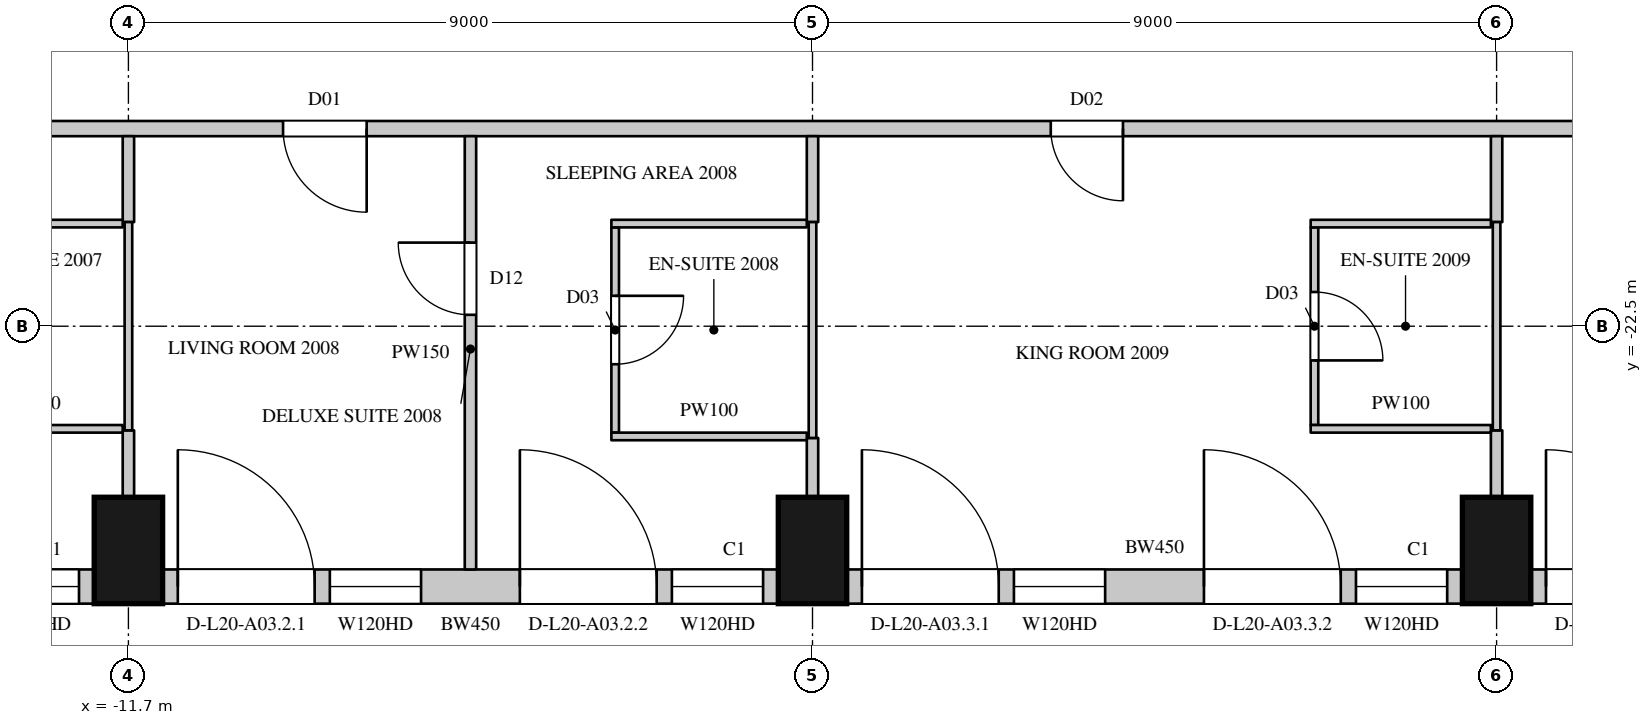
"""IFC4 building model, lengths in metres.
Left out: names, types, materials, properties, quantities, classifications, styles, units other than length and angle.
Written with IfcOpenShell. Run it as: python <this file> out.ifc"""

import sys

from ifc_helpers import new_model, si_unit, direction, frame, frame_2d, origin, origin_2d, place, context, subcontext, project, spatial, rectangle, extrude, element, fill, save


model = new_model("IFC4")
c1 = context("Model", 3, precision=1e-05, world=origin(), true_north=direction((0.0, 1.0)))
c2 = subcontext(c1, "Body", "Model", "MODEL_VIEW")
j1 = project(units=[si_unit("LENGTHUNIT", "METRE"), si_unit("PLANEANGLEUNIT", "RADIAN")], contexts=[c1])
p1 = place(None, origin())
s1 = spatial("IfcSite", under=j1, at=p1, CompositionType="ELEMENT")
p2 = place(p1, origin())
s2 = spatial("IfcBuilding", under=s1, at=p2, CompositionType="ELEMENT")
p3 = place(p2, frame((0.0, 0.0, 102.3)))
s3 = spatial("IfcBuildingStorey", under=s2, at=p3, CompositionType="ELEMENT", Elevation=102.3)
for number, where, z_axis, x_axis in (
    (1, (-11.7, -25.45, 0.0), (0.0, 0.0, 1.0), (1.0, 0.0, 0.0)),
    (2, (-2.7, -25.45, 0.0), (0.0, 0.0, 1.0), (1.0, 0.0, 0.0)),
    (3, (6.3, -25.45, 0.0), (0.0, 0.0, 1.0), (1.0, 0.0, 0.0)),
):
    element("IfcColumn", number, at=place(p3, frame(where, z_axis=z_axis, x_axis=x_axis)), inside=s3, PredefinedType="COLUMN", context=c2, shape_type="SweptSolid", body=[
        extrude(rectangle(XDim=0.9, YDim=1.4, at=origin_2d()), origin(), (0.0, 0.0, 1.0), 3.6),
    ])
p4 = place(p3, frame((-20.25, -25.925, 0.0), z_axis=(0.0, 0.0, 1.0), x_axis=(1.0, 0.0, 0.0)))
e4 = element("IfcWall", 4, at=p4, inside=s3, PredefinedType="SOLIDWALL", context=c2, shape_type="SweptSolid", body=[
    extrude(rectangle(XDim=8.1, YDim=0.45, at=frame_2d((4.05, 0.0))), origin(), (0.0, 0.0, 1.0), 3.3),
])
p5 = place(p4, frame((0.2, 0.0, 0.0)))
e5 = element("IfcOpeningElement", 5, at=p5, cuts=e4, PredefinedType="OPENING", context=c2, shape_type="SweptSolid", body=[
    extrude(rectangle(XDim=1.8, YDim=2.4, at=frame_2d((0.9, 1.2))), frame((0.0, 0.235, 0.0), z_axis=(0.0, -1.0, 0.0), x_axis=(1.0, 0.0, 0.0)), (0.0, 0.0, 1.0), 0.47),
])
p6 = place(p4, frame((2.2, 0.0, 1.05)))
e6 = element("IfcOpeningElement", 6, at=p6, cuts=e4, PredefinedType="OPENING", context=c2, shape_type="SweptSolid", body=[
    extrude(rectangle(XDim=1.2, YDim=2.0, at=frame_2d((0.6, 1.0))), frame((0.0, 0.235, 0.0), z_axis=(0.0, -1.0, 0.0), x_axis=(1.0, 0.0, 0.0)), (0.0, 0.0, 1.0), 0.47),
])
p7 = place(p4, frame((4.7, 0.0, 0.0)))
e7 = element("IfcOpeningElement", 7, at=p7, cuts=e4, PredefinedType="OPENING", context=c2, shape_type="SweptSolid", body=[
    extrude(rectangle(XDim=1.8, YDim=2.4, at=frame_2d((0.9, 1.2))), frame((0.0, 0.235, 0.0), z_axis=(0.0, -1.0, 0.0), x_axis=(1.0, 0.0, 0.0)), (0.0, 0.0, 1.0), 0.47),
])
p8 = place(p4, frame((6.7, 0.0, 1.05)))
e8 = element("IfcOpeningElement", 8, at=p8, cuts=e4, PredefinedType="OPENING", context=c2, shape_type="SweptSolid", body=[
    extrude(rectangle(XDim=1.2, YDim=2.0, at=frame_2d((0.6, 1.0))), frame((0.0, 0.235, 0.0), z_axis=(0.0, -1.0, 0.0), x_axis=(1.0, 0.0, 0.0)), (0.0, 0.0, 1.0), 0.47),
])
p9 = place(p3, frame((-11.25, -25.925, 0.0), z_axis=(0.0, 0.0, 1.0), x_axis=(1.0, 0.0, 0.0)))
e9 = element("IfcWall", 9, at=p9, inside=s3, PredefinedType="SOLIDWALL", context=c2, shape_type="SweptSolid", body=[
    extrude(rectangle(XDim=8.1, YDim=0.45, at=frame_2d((4.05, 0.0))), origin(), (0.0, 0.0, 1.0), 3.3),
])
p10 = place(p9, frame((0.2, 0.0, 0.0)))
e10 = element("IfcOpeningElement", 10, at=p10, cuts=e9, PredefinedType="OPENING", context=c2, shape_type="SweptSolid", body=[
    extrude(rectangle(XDim=1.8, YDim=2.4, at=frame_2d((0.9, 1.2))), frame((0.0, 0.235, 0.0), z_axis=(0.0, -1.0, 0.0), x_axis=(1.0, 0.0, 0.0)), (0.0, 0.0, 1.0), 0.47),
])
p11 = place(p9, frame((2.2, 0.0, 1.05)))
e11 = element("IfcOpeningElement", 11, at=p11, cuts=e9, PredefinedType="OPENING", context=c2, shape_type="SweptSolid", body=[
    extrude(rectangle(XDim=1.2, YDim=2.0, at=frame_2d((0.6, 1.0))), frame((0.0, 0.235, 0.0), z_axis=(0.0, -1.0, 0.0), x_axis=(1.0, 0.0, 0.0)), (0.0, 0.0, 1.0), 0.47),
])
p12 = place(p9, frame((4.7, 0.0, 0.0)))
e12 = element("IfcOpeningElement", 12, at=p12, cuts=e9, PredefinedType="OPENING", context=c2, shape_type="SweptSolid", body=[
    extrude(rectangle(XDim=1.8, YDim=2.4, at=frame_2d((0.9, 1.2))), frame((0.0, 0.235, 0.0), z_axis=(0.0, -1.0, 0.0), x_axis=(1.0, 0.0, 0.0)), (0.0, 0.0, 1.0), 0.47),
])
p13 = place(p9, frame((6.7, 0.0, 1.05)))
e13 = element("IfcOpeningElement", 13, at=p13, cuts=e9, PredefinedType="OPENING", context=c2, shape_type="SweptSolid", body=[
    extrude(rectangle(XDim=1.2, YDim=2.0, at=frame_2d((0.6, 1.0))), frame((0.0, 0.235, 0.0), z_axis=(0.0, -1.0, 0.0), x_axis=(1.0, 0.0, 0.0)), (0.0, 0.0, 1.0), 0.47),
])
p14 = place(p3, frame((-2.25, -25.925, 0.0), z_axis=(0.0, 0.0, 1.0), x_axis=(1.0, 0.0, 0.0)))
e14 = element("IfcWall", 14, at=p14, inside=s3, PredefinedType="SOLIDWALL", context=c2, shape_type="SweptSolid", body=[
    extrude(rectangle(XDim=8.1, YDim=0.45, at=frame_2d((4.05, 0.0))), origin(), (0.0, 0.0, 1.0), 3.3),
])
p15 = place(p14, frame((0.2, 0.0, 0.0)))
e15 = element("IfcOpeningElement", 15, at=p15, cuts=e14, PredefinedType="OPENING", context=c2, shape_type="SweptSolid", body=[
    extrude(rectangle(XDim=1.8, YDim=2.4, at=frame_2d((0.9, 1.2))), frame((0.0, 0.235, 0.0), z_axis=(0.0, -1.0, 0.0), x_axis=(1.0, 0.0, 0.0)), (0.0, 0.0, 1.0), 0.47),
])
p16 = place(p14, frame((2.2, 0.0, 1.05)))
e16 = element("IfcOpeningElement", 16, at=p16, cuts=e14, PredefinedType="OPENING", context=c2, shape_type="SweptSolid", body=[
    extrude(rectangle(XDim=1.2, YDim=2.0, at=frame_2d((0.6, 1.0))), frame((0.0, 0.235, 0.0), z_axis=(0.0, -1.0, 0.0), x_axis=(1.0, 0.0, 0.0)), (0.0, 0.0, 1.0), 0.47),
])
p17 = place(p14, frame((4.7, 0.0, 0.0)))
e17 = element("IfcOpeningElement", 17, at=p17, cuts=e14, PredefinedType="OPENING", context=c2, shape_type="SweptSolid", body=[
    extrude(rectangle(XDim=1.8, YDim=2.4, at=frame_2d((0.9, 1.2))), frame((0.0, 0.235, 0.0), z_axis=(0.0, -1.0, 0.0), x_axis=(1.0, 0.0, 0.0)), (0.0, 0.0, 1.0), 0.47),
])
p18 = place(p14, frame((6.7, 0.0, 1.05)))
e18 = element("IfcOpeningElement", 18, at=p18, cuts=e14, PredefinedType="OPENING", context=c2, shape_type="SweptSolid", body=[
    extrude(rectangle(XDim=1.2, YDim=2.0, at=frame_2d((0.6, 1.0))), frame((0.0, 0.235, 0.0), z_axis=(0.0, -1.0, 0.0), x_axis=(1.0, 0.0, 0.0)), (0.0, 0.0, 1.0), 0.47),
])
p19 = place(p3, frame((6.75, -25.925, 0.0), z_axis=(0.0, 0.0, 1.0), x_axis=(1.0, 0.0, 0.0)))
e19 = element("IfcWall", 19, at=p19, inside=s3, PredefinedType="SOLIDWALL", context=c2, shape_type="SweptSolid", body=[
    extrude(rectangle(XDim=8.1, YDim=0.45, at=frame_2d((4.05, 0.0))), origin(), (0.0, 0.0, 1.0), 3.3),
])
p20 = place(p19, frame((0.2, 0.0, 0.0)))
e20 = element("IfcOpeningElement", 20, at=p20, cuts=e19, PredefinedType="OPENING", context=c2, shape_type="SweptSolid", body=[
    extrude(rectangle(XDim=1.8, YDim=2.4, at=frame_2d((0.9, 1.2))), frame((0.0, 0.235, 0.0), z_axis=(0.0, -1.0, 0.0), x_axis=(1.0, 0.0, 0.0)), (0.0, 0.0, 1.0), 0.47),
])
p21 = place(p19, frame((2.2, 0.0, 1.05)))
e21 = element("IfcOpeningElement", 21, at=p21, cuts=e19, PredefinedType="OPENING", context=c2, shape_type="SweptSolid", body=[
    extrude(rectangle(XDim=1.2, YDim=2.0, at=frame_2d((0.6, 1.0))), frame((0.0, 0.235, 0.0), z_axis=(0.0, -1.0, 0.0), x_axis=(1.0, 0.0, 0.0)), (0.0, 0.0, 1.0), 0.47),
])
p22 = place(p19, frame((5.9, 0.0, 0.0)))
e22 = element("IfcOpeningElement", 22, at=p22, cuts=e19, PredefinedType="OPENING", context=c2, shape_type="SweptSolid", body=[
    extrude(rectangle(XDim=1.8, YDim=2.4, at=frame_2d((0.9, 1.2))), frame((0.0, 0.235, 0.0), z_axis=(0.0, -1.0, 0.0), x_axis=(1.0, 0.0, 0.0)), (0.0, 0.0, 1.0), 0.47),
])
p23 = place(p3, frame((-23.765, -19.9, 0.0), z_axis=(0.0, 0.0, 1.0), x_axis=(1.0, 0.0, 0.0)))
e23 = element("IfcWall", 23, at=p23, inside=s3, PredefinedType="PARTITIONING", context=c2, shape_type="SweptSolid", body=[
    extrude(rectangle(XDim=42.125, YDim=0.2, at=frame_2d((21.063, 0.0))), origin(), (0.0, 0.0, 1.0), 3.3),
])
p24 = place(p23, frame((6.2, 0.0, 0.0)))
e24 = element("IfcOpeningElement", 24, at=p24, cuts=e23, PredefinedType="OPENING", context=c2, shape_type="SweptSolid", body=[
    extrude(rectangle(XDim=0.95, YDim=2.2, at=frame_2d((0.475, 1.1))), frame((0.0, 0.11, 0.0), z_axis=(0.0, -1.0, 0.0), x_axis=(1.0, 0.0, 0.0)), (0.0, 0.0, 1.0), 0.22),
])
p25 = place(p23, frame((14.1, 0.0, 0.0)))
e25 = element("IfcOpeningElement", 25, at=p25, cuts=e23, PredefinedType="OPENING", context=c2, shape_type="SweptSolid", body=[
    extrude(rectangle(XDim=1.1, YDim=2.4, at=frame_2d((0.55, 1.2))), frame((0.0, 0.11, 0.0), z_axis=(0.0, -1.0, 0.0), x_axis=(1.0, 0.0, 0.0)), (0.0, 0.0, 1.0), 0.22),
])
p26 = place(p23, frame((24.2, 0.0, 0.0)))
e26 = element("IfcOpeningElement", 26, at=p26, cuts=e23, PredefinedType="OPENING", context=c2, shape_type="SweptSolid", body=[
    extrude(rectangle(XDim=0.95, YDim=2.2, at=frame_2d((0.475, 1.1))), frame((0.0, 0.11, 0.0), z_axis=(0.0, -1.0, 0.0), x_axis=(1.0, 0.0, 0.0)), (0.0, 0.0, 1.0), 0.22),
])
p27 = place(p23, frame((32.9, 0.0, 0.0)))
e27 = element("IfcOpeningElement", 27, at=p27, cuts=e23, PredefinedType="OPENING", context=c2, shape_type="SweptSolid", body=[
    extrude(rectangle(XDim=1.1, YDim=2.4, at=frame_2d((0.55, 1.2))), frame((0.0, 0.11, 0.0), z_axis=(0.0, -1.0, 0.0), x_axis=(1.0, 0.0, 0.0)), (0.0, 0.0, 1.0), 0.22),
])
p28 = place(p3, frame((-11.7, -24.75, 0.0), z_axis=(0.0, 0.0, 1.0), x_axis=(0.0, 1.0, 0.0)))
e28 = element("IfcWall", 28, at=p28, inside=s3, PredefinedType="PARTITIONING", context=c2, shape_type="SweptSolid", body=[
    extrude(rectangle(XDim=0.88, YDim=0.15, at=frame_2d((0.44, 0.0))), origin(), (0.0, 0.0, 1.0), 2.75),
])
p29 = place(p3, frame((-11.7, -21.13, 0.0), z_axis=(0.0, 0.0, 1.0), x_axis=(0.0, 1.0, 0.0)))
e29 = element("IfcWall", 29, at=p29, inside=s3, PredefinedType="PARTITIONING", context=c2, shape_type="SweptSolid", body=[
    extrude(rectangle(XDim=1.13, YDim=0.15, at=frame_2d((0.565, 0.0))), origin(), (0.0, 0.0, 1.0), 2.75),
])
p30 = place(p3, frame((-7.2, -25.7, 0.0), z_axis=(0.0, 0.0, 1.0), x_axis=(0.0, 1.0, 0.0)))
e30 = element("IfcWall", 30, at=p30, inside=s3, PredefinedType="PARTITIONING", context=c2, shape_type="SweptSolid", body=[
    extrude(rectangle(XDim=5.7, YDim=0.15, at=frame_2d((2.85, 0.0))), origin(), (0.0, 0.0, 1.0), 2.65),
])
p31 = place(p30, frame((3.35, 0.0, 0.0)))
e31 = element("IfcOpeningElement", 31, at=p31, cuts=e30, PredefinedType="OPENING", context=c2, shape_type="SweptSolid", body=[
    extrude(rectangle(XDim=0.95, YDim=2.2, at=frame_2d((0.475, 1.1))), frame((0.0, 0.085, 0.0), z_axis=(0.0, -1.0, 0.0), x_axis=(1.0, 0.0, 0.0)), (0.0, 0.0, 1.0), 0.17),
])
p32 = place(p3, frame((-2.7, -24.75, 0.0), z_axis=(0.0, 0.0, 1.0), x_axis=(0.0, 1.0, 0.0)))
e32 = element("IfcWall", 32, at=p32, inside=s3, PredefinedType="PARTITIONING", context=c2, shape_type="SweptSolid", body=[
    extrude(rectangle(XDim=0.78, YDim=0.15, at=frame_2d((0.39, 0.0))), origin(), (0.0, 0.0, 1.0), 2.75),
])
p33 = place(p3, frame((-2.7, -21.13, 0.0), z_axis=(0.0, 0.0, 1.0), x_axis=(0.0, 1.0, 0.0)))
e33 = element("IfcWall", 33, at=p33, inside=s3, PredefinedType="PARTITIONING", context=c2, shape_type="SweptSolid", body=[
    extrude(rectangle(XDim=1.13, YDim=0.15, at=frame_2d((0.565, 0.0))), origin(), (0.0, 0.0, 1.0), 2.75),
])
p34 = place(p3, frame((6.3, -24.75, 0.0), z_axis=(0.0, 0.0, 1.0), x_axis=(0.0, 1.0, 0.0)))
e34 = element("IfcWall", 34, at=p34, inside=s3, PredefinedType="PARTITIONING", context=c2, shape_type="SweptSolid", body=[
    extrude(rectangle(XDim=0.88, YDim=0.15, at=frame_2d((0.44, 0.0))), origin(), (0.0, 0.0, 1.0), 2.75),
])
p35 = place(p3, frame((6.3, -21.13, 0.0), z_axis=(0.0, 0.0, 1.0), x_axis=(0.0, 1.0, 0.0)))
e35 = element("IfcWall", 35, at=p35, inside=s3, PredefinedType="PARTITIONING", context=c2, shape_type="SweptSolid", body=[
    extrude(rectangle(XDim=1.13, YDim=0.15, at=frame_2d((0.565, 0.0))), origin(), (0.0, 0.0, 1.0), 2.75),
])
for number, where, z_axis, x_axis in (
    (36, (-14.146, -23.85, 0.0), (0.0, 0.0, 1.0), (1.0, 0.0, 0.0)),
    (37, (-14.146, -21.15, 0.0), (0.0, 0.0, 1.0), (1.0, 0.0, 0.0)),
):
    element("IfcWall", number, at=place(p3, frame(where, z_axis=z_axis, x_axis=x_axis)), inside=s3, PredefinedType="PARTITIONING", context=c2, shape_type="SweptSolid", body=[
        extrude(rectangle(XDim=2.371, YDim=0.1, at=frame_2d((1.186, 0.0))), origin(), (0.0, 0.0, 1.0), 3.3),
    ])
p36 = place(p3, frame((-11.7, -23.87, 0.0), z_axis=(0.0, 0.0, 1.0), x_axis=(0.0, 1.0, 0.0)))
e38 = element("IfcWall", 38, at=p36, inside=s3, PredefinedType="PARTITIONING", context=c2, shape_type="SweptSolid", body=[
    extrude(rectangle(XDim=2.74, YDim=0.1, at=frame_2d((1.37, 0.0))), origin(), (0.0, 0.0, 1.0), 2.75),
])
p37 = place(p3, frame((-5.296, -23.9, 0.0), z_axis=(0.0, 0.0, 1.0), x_axis=(0.0, 1.0, 0.0)))
e39 = element("IfcWall", 39, at=p37, inside=s3, PredefinedType="PARTITIONING", context=c2, shape_type="SweptSolid", body=[
    extrude(rectangle(XDim=2.7, YDim=0.1, at=frame_2d((1.35, 0.0))), origin(), (0.0, 0.0, 1.0), 3.3),
])
p38 = place(p37, frame((0.9, 0.0, 0.0)))
e40 = element("IfcOpeningElement", 40, at=p38, cuts=e39, PredefinedType="OPENING", context=c2, shape_type="SweptSolid", body=[
    extrude(rectangle(XDim=0.9, YDim=2.2, at=frame_2d((0.45, 1.1))), frame((0.0, 0.06, 0.0), z_axis=(0.0, -1.0, 0.0), x_axis=(1.0, 0.0, 0.0)), (0.0, 0.0, 1.0), 0.12),
])
for number, where, z_axis, x_axis in (
    (41, (-5.346, -23.95, 0.0), (0.0, 0.0, 1.0), (1.0, 0.0, 0.0)),
    (42, (-5.346, -21.15, 0.0), (0.0, 0.0, 1.0), (1.0, 0.0, 0.0)),
):
    element("IfcWall", number, at=place(p3, frame(where, z_axis=z_axis, x_axis=x_axis)), inside=s3, PredefinedType="PARTITIONING", context=c2, shape_type="SweptSolid", body=[
        extrude(rectangle(XDim=2.571, YDim=0.1, at=frame_2d((1.286, 0.0))), origin(), (0.0, 0.0, 1.0), 3.3),
    ])
p39 = place(p3, frame((-2.7, -23.97, 0.0), z_axis=(0.0, 0.0, 1.0), x_axis=(0.0, 1.0, 0.0)))
e43 = element("IfcWall", 43, at=p39, inside=s3, PredefinedType="PARTITIONING", context=c2, shape_type="SweptSolid", body=[
    extrude(rectangle(XDim=2.84, YDim=0.1, at=frame_2d((1.42, 0.0))), origin(), (0.0, 0.0, 1.0), 2.75),
])
p40 = place(p3, frame((3.904, -23.8, 0.0), z_axis=(0.0, 0.0, 1.0), x_axis=(0.0, 1.0, 0.0)))
e44 = element("IfcWall", 44, at=p40, inside=s3, PredefinedType="PARTITIONING", context=c2, shape_type="SweptSolid", body=[
    extrude(rectangle(XDim=2.6, YDim=0.1, at=frame_2d((1.3, 0.0))), origin(), (0.0, 0.0, 1.0), 3.3),
])
p41 = place(p40, frame((0.85, 0.0, 0.0)))
e45 = element("IfcOpeningElement", 45, at=p41, cuts=e44, PredefinedType="OPENING", context=c2, shape_type="SweptSolid", body=[
    extrude(rectangle(XDim=0.9, YDim=2.2, at=frame_2d((0.45, 1.1))), frame((0.0, 0.06, 0.0), z_axis=(0.0, -1.0, 0.0), x_axis=(1.0, 0.0, 0.0)), (0.0, 0.0, 1.0), 0.12),
])
for number, where, z_axis, x_axis in (
    (46, (3.854, -23.85, 0.0), (0.0, 0.0, 1.0), (1.0, 0.0, 0.0)),
    (47, (3.854, -21.15, 0.0), (0.0, 0.0, 1.0), (1.0, 0.0, 0.0)),
):
    element("IfcWall", number, at=place(p3, frame(where, z_axis=z_axis, x_axis=x_axis)), inside=s3, PredefinedType="PARTITIONING", context=c2, shape_type="SweptSolid", body=[
        extrude(rectangle(XDim=2.371, YDim=0.1, at=frame_2d((1.186, 0.0))), origin(), (0.0, 0.0, 1.0), 3.3),
    ])
p42 = place(p3, frame((6.3, -23.87, 0.0), z_axis=(0.0, 0.0, 1.0), x_axis=(0.0, 1.0, 0.0)))
e48 = element("IfcWall", 48, at=p42, inside=s3, PredefinedType="PARTITIONING", context=c2, shape_type="SweptSolid", body=[
    extrude(rectangle(XDim=2.74, YDim=0.1, at=frame_2d((1.37, 0.0))), origin(), (0.0, 0.0, 1.0), 2.75),
])
p43 = place(p8, origin())
e49 = element("IfcWindow", 49, at=p43, inside=s3, PartitioningType="SINGLE_PANEL", PredefinedType="WINDOW", context=c2, shape_type="SweptSolid", body=[
    extrude(rectangle(XDim=1.2, YDim=2.0, at=frame_2d((0.6, 1.0))), frame((0.0, 0.135, 0.0), z_axis=(0.0, -1.0, 0.0), x_axis=(1.0, 0.0, 0.0)), (0.0, 0.0, 1.0), 0.06),
])
fill(e8, e49)
p44 = place(p10, origin())
e50 = element("IfcDoor", 50, at=p44, inside=s3, OperationType="SLIDING_TO_LEFT", PredefinedType="DOOR", context=c2, shape_type="SweptSolid", body=[
    extrude(rectangle(XDim=1.8, YDim=2.4, at=frame_2d((0.9, 1.2))), frame((0.0, 0.13, 0.0), z_axis=(0.0, -1.0, 0.0), x_axis=(1.0, 0.0, 0.0)), (0.0, 0.0, 1.0), 0.05),
])
fill(e10, e50)
p45 = place(p11, origin())
e51 = element("IfcWindow", 51, at=p45, inside=s3, PartitioningType="SINGLE_PANEL", PredefinedType="WINDOW", context=c2, shape_type="SweptSolid", body=[
    extrude(rectangle(XDim=1.2, YDim=2.0, at=frame_2d((0.6, 1.0))), frame((0.0, 0.135, 0.0), z_axis=(0.0, -1.0, 0.0), x_axis=(1.0, 0.0, 0.0)), (0.0, 0.0, 1.0), 0.06),
])
fill(e11, e51)
p46 = place(p12, origin())
e52 = element("IfcDoor", 52, at=p46, inside=s3, OperationType="SLIDING_TO_LEFT", PredefinedType="DOOR", context=c2, shape_type="SweptSolid", body=[
    extrude(rectangle(XDim=1.8, YDim=2.4, at=frame_2d((0.9, 1.2))), frame((0.0, 0.13, 0.0), z_axis=(0.0, -1.0, 0.0), x_axis=(1.0, 0.0, 0.0)), (0.0, 0.0, 1.0), 0.05),
])
fill(e12, e52)
p47 = place(p13, origin())
e53 = element("IfcWindow", 53, at=p47, inside=s3, PartitioningType="SINGLE_PANEL", PredefinedType="WINDOW", context=c2, shape_type="SweptSolid", body=[
    extrude(rectangle(XDim=1.2, YDim=2.0, at=frame_2d((0.6, 1.0))), frame((0.0, 0.135, 0.0), z_axis=(0.0, -1.0, 0.0), x_axis=(1.0, 0.0, 0.0)), (0.0, 0.0, 1.0), 0.06),
])
fill(e13, e53)
p48 = place(p15, origin())
e54 = element("IfcDoor", 54, at=p48, inside=s3, OperationType="SLIDING_TO_LEFT", PredefinedType="DOOR", context=c2, shape_type="SweptSolid", body=[
    extrude(rectangle(XDim=1.8, YDim=2.4, at=frame_2d((0.9, 1.2))), frame((0.0, 0.13, 0.0), z_axis=(0.0, -1.0, 0.0), x_axis=(1.0, 0.0, 0.0)), (0.0, 0.0, 1.0), 0.05),
])
fill(e15, e54)
p49 = place(p16, origin())
e55 = element("IfcWindow", 55, at=p49, inside=s3, PartitioningType="SINGLE_PANEL", PredefinedType="WINDOW", context=c2, shape_type="SweptSolid", body=[
    extrude(rectangle(XDim=1.2, YDim=2.0, at=frame_2d((0.6, 1.0))), frame((0.0, 0.135, 0.0), z_axis=(0.0, -1.0, 0.0), x_axis=(1.0, 0.0, 0.0)), (0.0, 0.0, 1.0), 0.06),
])
fill(e16, e55)
p50 = place(p17, origin())
e56 = element("IfcDoor", 56, at=p50, inside=s3, OperationType="SLIDING_TO_LEFT", PredefinedType="DOOR", context=c2, shape_type="SweptSolid", body=[
    extrude(rectangle(XDim=1.8, YDim=2.4, at=frame_2d((0.9, 1.2))), frame((0.0, 0.13, 0.0), z_axis=(0.0, -1.0, 0.0), x_axis=(1.0, 0.0, 0.0)), (0.0, 0.0, 1.0), 0.05),
])
fill(e17, e56)
p51 = place(p18, origin())
e57 = element("IfcWindow", 57, at=p51, inside=s3, PartitioningType="SINGLE_PANEL", PredefinedType="WINDOW", context=c2, shape_type="SweptSolid", body=[
    extrude(rectangle(XDim=1.2, YDim=2.0, at=frame_2d((0.6, 1.0))), frame((0.0, 0.135, 0.0), z_axis=(0.0, -1.0, 0.0), x_axis=(1.0, 0.0, 0.0)), (0.0, 0.0, 1.0), 0.06),
])
fill(e18, e57)
p52 = place(p20, origin())
e58 = element("IfcDoor", 58, at=p52, inside=s3, OperationType="SLIDING_TO_LEFT", PredefinedType="DOOR", context=c2, shape_type="SweptSolid", body=[
    extrude(rectangle(XDim=1.8, YDim=2.4, at=frame_2d((0.9, 1.2))), frame((0.0, 0.13, 0.0), z_axis=(0.0, -1.0, 0.0), x_axis=(1.0, 0.0, 0.0)), (0.0, 0.0, 1.0), 0.05),
])
fill(e20, e58)
p53 = place(p25, origin())
e59 = element("IfcDoor", 59, at=p53, inside=s3, OperationType="SINGLE_SWING_LEFT", PredefinedType="DOOR", context=c2, shape_type="SweptSolid", body=[
    extrude(rectangle(XDim=1.1, YDim=2.4, at=frame_2d((0.55, 1.2))), frame((0.0, 0.025, 0.0), z_axis=(0.0, -1.0, 0.0), x_axis=(1.0, 0.0, 0.0)), (0.0, 0.0, 1.0), 0.05),
])
fill(e25, e59)
p54 = place(p31, origin())
e60 = element("IfcDoor", 60, at=p54, inside=s3, OperationType="SINGLE_SWING_RIGHT", PredefinedType="DOOR", context=c2, shape_type="SweptSolid", body=[
    extrude(rectangle(XDim=0.95, YDim=2.2, at=frame_2d((0.475, 1.1))), frame((0.0, 0.025, 0.0), z_axis=(0.0, -1.0, 0.0), x_axis=(1.0, 0.0, 0.0)), (0.0, 0.0, 1.0), 0.05),
])
fill(e31, e60)
p55 = place(p38, origin())
e61 = element("IfcDoor", 61, at=p55, inside=s3, OperationType="SINGLE_SWING_LEFT", PredefinedType="DOOR", context=c2, shape_type="SweptSolid", body=[
    extrude(rectangle(XDim=0.9, YDim=2.2, at=frame_2d((0.45, 1.1))), frame((0.0, 0.025, 0.0), z_axis=(0.0, -1.0, 0.0), x_axis=(1.0, 0.0, 0.0)), (0.0, 0.0, 1.0), 0.05),
])
fill(e40, e61)
p56 = place(p26, origin())
e62 = element("IfcDoor", 62, at=p56, inside=s3, OperationType="SINGLE_SWING_LEFT", PredefinedType="DOOR", context=c2, shape_type="SweptSolid", body=[
    extrude(rectangle(XDim=0.95, YDim=2.2, at=frame_2d((0.475, 1.1))), frame((0.0, 0.025, 0.0), z_axis=(0.0, -1.0, 0.0), x_axis=(1.0, 0.0, 0.0)), (0.0, 0.0, 1.0), 0.05),
])
fill(e26, e62)
p57 = place(p41, origin())
e63 = element("IfcDoor", 63, at=p57, inside=s3, OperationType="SINGLE_SWING_RIGHT", PredefinedType="DOOR", context=c2, shape_type="SweptSolid", body=[
    extrude(rectangle(XDim=0.9, YDim=2.2, at=frame_2d((0.45, 1.1))), frame((0.0, 0.025, 0.0), z_axis=(0.0, -1.0, 0.0), x_axis=(1.0, 0.0, 0.0)), (0.0, 0.0, 1.0), 0.05),
])
fill(e45, e63)
save(model, sys.argv[1])
